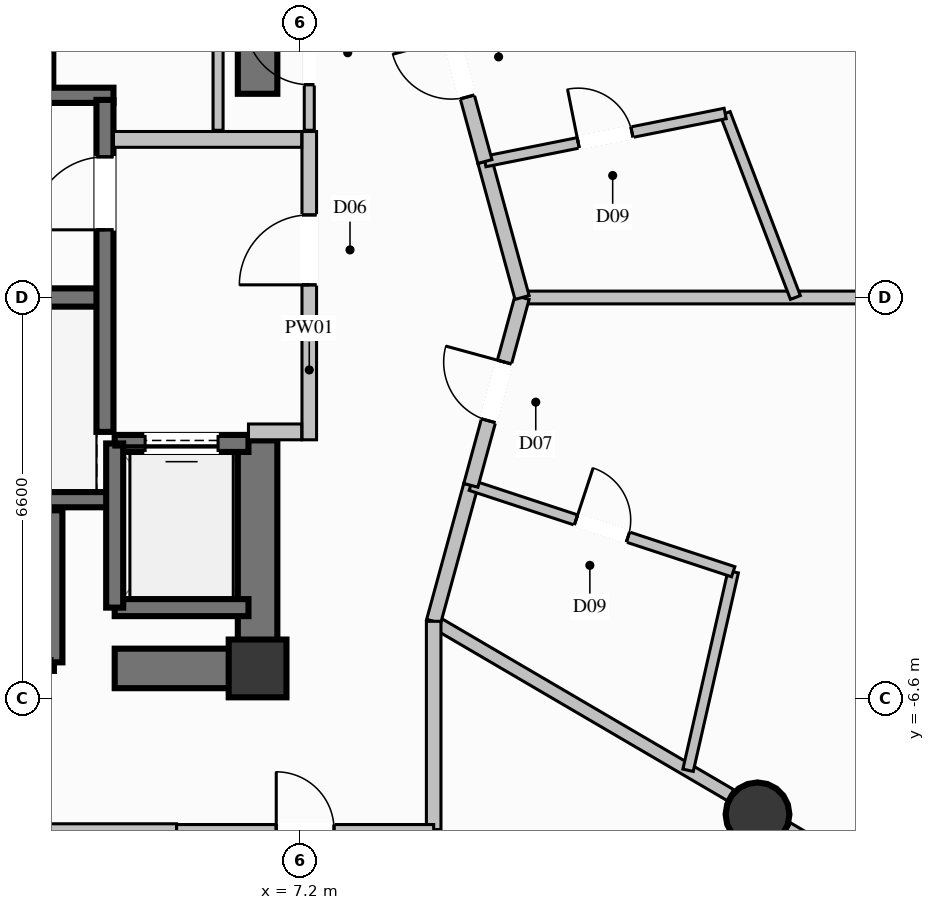
"""IFC4 building model, lengths in metres.
Left out: names, types, materials, properties, quantities, classifications, styles, units other than length and angle.
Written with IfcOpenShell. Run it as: python <this file> out.ifc"""

import sys

from ifc_helpers import new_model, si_unit, direction, frame, frame_2d, origin, origin_2d, place, context, subcontext, project, spatial, rectangle, circle, extrude, element, fill, save


model = new_model("IFC4")
c1 = context("Model", 3, precision=1e-05, world=origin(), true_north=direction((0.0, 1.0)))
c2 = subcontext(c1, "Body", "Model", "MODEL_VIEW")
j1 = project(units=[si_unit("LENGTHUNIT", "METRE"), si_unit("PLANEANGLEUNIT", "RADIAN")], contexts=[c1])
p1 = place(None, origin())
s1 = spatial("IfcSite", under=j1, at=p1, CompositionType="ELEMENT")
p2 = place(p1, origin())
s2 = spatial("IfcBuilding", under=s1, at=p2, CompositionType="ELEMENT")
p3 = place(p2, frame((0.0, 0.0, 109.8)))
s3 = spatial("IfcBuildingStorey", under=s2, at=p3, CompositionType="ELEMENT", Elevation=109.8)
p4 = place(p3, frame((6.5, -6.1, 0.0), z_axis=(0.0, 0.0, 1.0), x_axis=(1.0, 0.0, 0.0)))
e1 = element("IfcColumn", 1, at=p4, inside=s3, PredefinedType="COLUMN", context=c2, shape_type="SweptSolid", body=[
    extrude(rectangle(XDim=0.95, YDim=0.95, at=origin_2d()), origin(), (0.0, 0.0, 1.0), 3.6),
])
p5 = place(p3, frame((-3.99, 0.0, 0.0), z_axis=(0.0, 0.0, 1.0), x_axis=(1.0, 0.0, 0.0)))
e2 = element("IfcWall", 2, at=p5, inside=s3, PredefinedType="SHEAR", context=c2, shape_type="SweptSolid", body=[
    extrude(rectangle(XDim=7.98, YDim=0.3, at=frame_2d((3.99, 0.0))), origin(), (0.0, 0.0, 1.0), 3.6),
])
for number, where, z_axis, x_axis in (
    (3, (-4.13, -3.325, 0.0), (0.0, 0.0, 1.0), (1.0, 0.0, 0.0)),
    (4, (-4.13, 3.325, 0.0), (0.0, 0.0, 1.0), (1.0, 0.0, 0.0)),
):
    element("IfcWall", number, at=place(p3, frame(where, z_axis=z_axis, x_axis=x_axis)), inside=s3, PredefinedType="SOLIDWALL", context=c2, shape_type="SweptSolid", body=[
        extrude(rectangle(XDim=8.26, YDim=0.25, at=frame_2d((4.13, 0.0))), origin(), (0.0, 0.0, 1.0), 3.6),
    ])
p6 = place(p3, frame((4.15, -6.1, 0.0), z_axis=(0.0, 0.0, 1.0), x_axis=(1.0, 0.0, 0.0)))
e5 = element("IfcWall", 5, at=p6, inside=s3, PredefinedType="SHEAR", context=c2, shape_type="SweptSolid", body=[
    extrude(rectangle(XDim=2.025, YDim=0.65, at=frame_2d((1.013, 0.0))), origin(), (0.0, 0.0, 1.0), 3.6),
])
p7 = place(p3, frame((6.5, -6.425, 0.0), z_axis=(0.0, 0.0, 1.0), x_axis=(0.0, 1.0, 0.0)))
e6 = element("IfcWall", 6, at=p7, inside=s3, PredefinedType="SHEAR", context=c2, shape_type="SweptSolid", body=[
    extrude(rectangle(XDim=4.075, YDim=0.65, at=frame_2d((2.038, 0.0))), origin(), (0.0, 0.0, 1.0), 3.6),
])
p8 = place(p3, frame((6.5, 3.35, 0.0), z_axis=(0.0, 0.0, 1.0), x_axis=(0.0, 1.0, 0.0)))
e7 = element("IfcWall", 7, at=p8, inside=s3, PredefinedType="SHEAR", context=c2, shape_type="SweptSolid", body=[
    extrude(rectangle(XDim=3.075, YDim=0.65, at=frame_2d((1.538, 0.0))), origin(), (0.0, 0.0, 1.0), 3.6),
])
p9 = place(p3, frame((14.722, -8.5, 0.0), z_axis=(0.0, 0.0, 1.0), x_axis=(1.0, 0.0, 0.0)))
e8 = element("IfcColumn", 8, at=p9, inside=s3, PredefinedType="COLUMN", context=c2, shape_type="SweptSolid", body=[
    extrude(circle(Radius=0.525, at=origin_2d()), origin(), (0.0, 0.0, 1.0), 3.6),
])
p10 = place(p3, frame((1.05, -6.0, 0.0), z_axis=(0.0, 0.0, 1.0), x_axis=(1.0, 0.0, 0.0)))
e9 = element("IfcWall", 9, at=p10, inside=s3, PredefinedType="SOLIDWALL", context=c2, shape_type="SweptSolid", body=[
    extrude(rectangle(XDim=2.1, YDim=0.28, at=frame_2d((1.05, 0.0))), origin(), (0.0, 0.0, 1.0), 3.35),
])
p11 = place(p10, frame((0.5, 0.0, 0.0)))
e10 = element("IfcOpeningElement", 10, at=p11, cuts=e9, PredefinedType="OPENING", context=c2, shape_type="SweptSolid", body=[
    extrude(rectangle(XDim=1.1, YDim=2.2, at=frame_2d((0.55, 1.1))), frame((0.0, 0.15, 0.0), z_axis=(0.0, -1.0, 0.0), x_axis=(1.0, 0.0, 0.0)), (0.0, 0.0, 1.0), 0.3),
])
for number, where, z_axis, x_axis in (
    (11, (3.15, -6.0, 0.0), (0.0, 0.0, 1.0), (0.0, 1.0, 0.0)),
    (12, (3.0, 3.5, 0.0), (0.0, 0.0, 1.0), (0.0, 1.0, 0.0)),
):
    element("IfcWall", number, at=place(p3, frame(where, z_axis=z_axis, x_axis=x_axis)), inside=s3, PredefinedType="SOLIDWALL", context=c2, shape_type="SweptSolid", body=[
        extrude(rectangle(XDim=2.5, YDim=0.28, at=frame_2d((1.25, 0.0))), origin(), (0.0, 0.0, 1.0), 3.35),
    ])
p12 = place(p3, frame((4.15, -5.1, 0.0), z_axis=(0.0, 0.0, 1.0), x_axis=(1.0, 0.0, 0.0)))
e13 = element("IfcWall", 13, at=p12, inside=s3, PredefinedType="SOLIDWALL", context=c2, shape_type="SweptSolid", body=[
    extrude(rectangle(XDim=2.2, YDim=0.28, at=frame_2d((1.1, 0.0))), origin(), (0.0, 0.0, 1.0), 3.35),
])
p13 = place(p3, frame((6.35, -2.4, 0.0), z_axis=(0.0, 0.0, 1.0), x_axis=(-1.0, 0.0, 0.0)))
e14 = element("IfcWall", 14, at=p13, inside=s3, PredefinedType="SOLIDWALL", context=c2, shape_type="SweptSolid", body=[
    extrude(rectangle(XDim=2.2, YDim=0.28, at=frame_2d((1.1, 0.0))), origin(), (0.0, 0.0, 1.0), 3.35),
])
p14 = place(p13, frame((0.5, 0.0, 0.0)))
e15 = element("IfcOpeningElement", 15, at=p14, cuts=e14, PredefinedType="OPENING", context=c2, shape_type="SweptSolid", body=[
    extrude(rectangle(XDim=1.2, YDim=2.2, at=frame_2d((0.6, 1.1))), frame((0.0, 0.15, 0.0), z_axis=(0.0, -1.0, 0.0), x_axis=(1.0, 0.0, 0.0)), (0.0, 0.0, 1.0), 0.3),
])
p15 = place(p3, frame((4.15, -2.4, 0.0), z_axis=(0.0, 0.0, 1.0), x_axis=(0.0, -1.0, 0.0)))
e16 = element("IfcWall", 16, at=p15, inside=s3, PredefinedType="SOLIDWALL", context=c2, shape_type="SweptSolid", body=[
    extrude(rectangle(XDim=2.7, YDim=0.28, at=frame_2d((1.35, 0.0))), origin(), (0.0, 0.0, 1.0), 3.35),
])
p16 = place(p3, frame((3.99, -2.21, 0.0), z_axis=(0.0, 0.0, 1.0), x_axis=(0.0, 1.0, 0.0)))
e17 = element("IfcWall", 17, at=p16, inside=s3, PredefinedType="SOLIDWALL", context=c2, shape_type="SweptSolid", body=[
    extrude(rectangle(XDim=5.46, YDim=0.28, at=frame_2d((2.73, 0.0))), origin(), (0.0, 0.0, 1.0), 3.35),
])
p17 = place(p16, frame((3.323, 0.0, 0.0)))
e18 = element("IfcOpeningElement", 18, at=p17, cuts=e17, PredefinedType="OPENING", context=c2, shape_type="SweptSolid", body=[
    extrude(rectangle(XDim=1.2, YDim=2.2, at=frame_2d((0.6, 1.1))), frame((0.0, 0.15, 0.0), z_axis=(0.0, -1.0, 0.0), x_axis=(1.0, 0.0, 0.0)), (0.0, 0.0, 1.0), 0.3),
])
p18 = place(p3, frame((7.35, -2.34, 0.0), z_axis=(0.0, 0.0, 1.0), x_axis=(0.0, 1.0, 0.0)))
e19 = element("IfcWall", 19, at=p18, inside=s3, PredefinedType="PARTITIONING", context=c2, shape_type="SweptSolid", body=[
    extrude(rectangle(XDim=5.07, YDim=0.24, at=frame_2d((2.535, 0.0))), origin(), (0.0, 0.0, 1.0), 2.435),
])
p19 = place(p18, frame((2.548, 0.0, 0.0)))
e20 = element("IfcOpeningElement", 20, at=p19, cuts=e19, PredefinedType="OPENING", context=c2, shape_type="SweptSolid", body=[
    extrude(rectangle(XDim=1.15, YDim=2.2, at=frame_2d((0.575, 1.1))), frame((0.0, 0.13, 0.0), z_axis=(0.0, -1.0, 0.0), x_axis=(1.0, 0.0, 0.0)), (0.0, 0.0, 1.0), 0.26),
])
p20 = place(p3, frame((6.35, -2.21, 0.0), z_axis=(0.0, 0.0, 1.0), x_axis=(1.0, 0.0, 0.0)))
e21 = element("IfcWall", 21, at=p20, inside=s3, PredefinedType="PARTITIONING", context=c2, shape_type="SweptSolid", body=[
    extrude(rectangle(XDim=0.875, YDim=0.26, at=frame_2d((0.438, 0.0))), origin(), (0.0, 0.0, 1.0), 3.35),
])
p21 = place(p3, frame((4.13, 2.6, 0.0), z_axis=(0.0, 0.0, 1.0), x_axis=(1.0, 0.0, 0.0)))
e22 = element("IfcWall", 22, at=p21, inside=s3, PredefinedType="PARTITIONING", context=c2, shape_type="SweptSolid", body=[
    extrude(rectangle(XDim=3.095, YDim=0.26, at=frame_2d((1.548, 0.0))), origin(), (0.0, 0.0, 1.0), 3.35),
])
p22 = place(p3, frame((7.35, 2.75, 0.0), z_axis=(0.0, 0.0, 1.0), x_axis=(0.0, 1.0, 0.0)))
e23 = element("IfcWall", 23, at=p22, inside=s3, PredefinedType="PARTITIONING", context=c2, shape_type="SweptSolid", body=[
    extrude(rectangle(XDim=2.55, YDim=0.165, at=frame_2d((1.275, 0.0))), origin(), (0.0, 0.0, 1.0), 3.35),
])
p23 = place(p22, frame((0.75, 0.0, 0.0)))
e24 = element("IfcOpeningElement", 24, at=p23, cuts=e23, PredefinedType="OPENING", context=c2, shape_type="SweptSolid", body=[
    extrude(rectangle(XDim=1.05, YDim=2.15, at=frame_2d((0.525, 1.075))), frame((0.0, 0.093, 0.0), z_axis=(0.0, -1.0, 0.0), x_axis=(1.0, 0.0, 0.0)), (0.0, 0.0, 1.0), 0.185),
])
p24 = place(p3, frame((5.85, 5.3, 0.0), z_axis=(0.0, 0.0, 1.0), x_axis=(0.0, -1.0, 0.0)))
e25 = element("IfcWall", 25, at=p24, inside=s3, PredefinedType="PARTITIONING", context=c2, shape_type="SweptSolid", body=[
    extrude(rectangle(XDim=2.55, YDim=0.165, at=frame_2d((1.275, 0.0))), origin(), (0.0, 0.0, 1.0), 2.435),
])
p25 = place(p3, frame((10.85, 0.0, 0.0), z_axis=(0.0, 0.0, 1.0), x_axis=(1.0, 0.0, 0.0)))
e26 = element("IfcWall", 26, at=p25, inside=s3, PredefinedType="PARTITIONING", context=c2, shape_type="SweptSolid", body=[
    extrude(rectangle(XDim=5.605, YDim=0.21, at=frame_2d((2.802, 0.0))), origin(), (0.0, 0.0, 1.0), 2.421),
])
p26 = place(p3, frame((9.396, -5.325, 0.0), z_axis=(0.0, 0.0, 1.0), x_axis=(0.862912125579, -0.505353998232, 0.0)))
e27 = element("IfcWall", 27, at=p26, inside=s3, PredefinedType="PARTITIONING", context=c2, shape_type="SweptSolid", body=[
    extrude(rectangle(XDim=5.658, YDim=0.21, at=frame_2d((2.829, 0.0))), origin(), (0.0, 0.0, 1.0), 2.791),
])
p27 = place(p3, frame((15.215, -8.732, 0.0), z_axis=(0.0, 0.0, 1.0), x_axis=(0.862960241997, -0.505271828556, 0.0)))
e28 = element("IfcWall", 28, at=p27, inside=s3, PredefinedType="PARTITIONING", context=c2, shape_type="SweptSolid", body=[
    extrude(rectangle(XDim=7.517, YDim=0.21, at=frame_2d((3.758, 0.0))), origin(), (0.0, 0.0, 1.0), 3.35),
])
p28 = place(p3, frame((9.396, -5.325, 0.0), z_axis=(0.0, 0.0, 1.0), x_axis=(0.263643210908, 0.964620265878, 0.0)))
e29 = element("IfcWall", 29, at=p28, inside=s3, PredefinedType="PARTITIONING", context=c2, shape_type="SweptSolid", body=[
    extrude(rectangle(XDim=2.318, YDim=0.24, at=frame_2d((1.159, 0.0))), origin(), (0.0, 0.0, 1.0), 3.35),
])
p29 = place(p3, frame((13.58, -7.775, 0.0), z_axis=(0.0, 0.0, 1.0), x_axis=(0.221599041774, 0.975137869578, 0.0)))
e30 = element("IfcWall", 30, at=p29, inside=s3, PredefinedType="PLUMBINGWALL", context=c2, shape_type="SweptSolid", body=[
    extrude(rectangle(XDim=3.348, YDim=0.175, at=frame_2d((1.674, 0.0))), origin(), (0.0, 0.0, 1.0), 3.35),
])
p30 = place(p3, frame((10.007, -3.089, 0.0), z_axis=(0.0, 0.0, 1.0), x_axis=(0.949827092004, -0.312775471057, 0.0)))
e31 = element("IfcWall", 31, at=p30, inside=s3, PredefinedType="PLUMBINGWALL", context=c2, shape_type="SweptSolid", body=[
    extrude(rectangle(XDim=4.543, YDim=0.175, at=frame_2d((2.271, 0.0))), origin(), (0.0, 0.0, 1.0), 3.35),
])
p31 = place(p30, frame((1.821, 0.0, 0.0)))
e32 = element("IfcOpeningElement", 32, at=p31, cuts=e31, PredefinedType="OPENING", context=c2, shape_type="SweptSolid", body=[
    extrude(rectangle(XDim=0.9, YDim=2.1, at=frame_2d((0.45, 1.05))), frame((0.0, 0.098, 0.0), z_axis=(0.0, -1.0, 0.0), x_axis=(1.0, 0.0, 0.0)), (0.0, 0.0, 1.0), 0.195),
])
p32 = place(p3, frame((10.007, -3.089, 0.0), z_axis=(0.0, 0.0, 1.0), x_axis=(0.263272237376, 0.964721581093, 0.0)))
e33 = element("IfcWall", 33, at=p32, inside=s3, PredefinedType="PARTITIONING", context=c2, shape_type="SweptSolid", body=[
    extrude(rectangle(XDim=3.202, YDim=0.24, at=frame_2d((1.601, 0.0))), origin(), (0.0, 0.0, 1.0), 2.985),
])
p33 = place(p32, frame((1.101, 0.0, 0.0)))
e34 = element("IfcOpeningElement", 34, at=p33, cuts=e33, PredefinedType="OPENING", context=c2, shape_type="SweptSolid", body=[
    extrude(rectangle(XDim=1.0, YDim=2.2, at=frame_2d((0.5, 1.1))), frame((0.0, 0.13, 0.0), z_axis=(0.0, -1.0, 0.0), x_axis=(1.0, 0.0, 0.0)), (0.0, 0.0, 1.0), 0.26),
])
p34 = place(p3, frame((10.85, 0.0, 0.0), z_axis=(0.0, 0.0, 1.0), x_axis=(-0.263616426241, 0.964627586074, 0.0)))
e35 = element("IfcWall", 35, at=p34, inside=s3, PredefinedType="PARTITIONING", context=c2, shape_type="SweptSolid", body=[
    extrude(rectangle(XDim=2.318, YDim=0.24, at=frame_2d((1.159, 0.0))), origin(), (0.0, 0.0, 1.0), 2.985),
])
p35 = place(p3, frame((15.345, 0.0, 0.0), z_axis=(0.0, 0.0, 1.0), x_axis=(-0.35661902988, 0.934249895653, 0.0)))
e36 = element("IfcWall", 36, at=p35, inside=s3, PredefinedType="PLUMBINGWALL", context=c2, shape_type="SweptSolid", body=[
    extrude(rectangle(XDim=3.239, YDim=0.175, at=frame_2d((1.619, 0.0))), origin(), (0.0, 0.0, 1.0), 3.35),
])
p36 = place(p3, frame((10.239, 2.236, 0.0), z_axis=(0.0, 0.0, 1.0), x_axis=(0.980599315693, 0.196022912085, 0.0)))
e37 = element("IfcWall", 37, at=p36, inside=s3, PredefinedType="PLUMBINGWALL", context=c2, shape_type="SweptSolid", body=[
    extrude(rectangle(XDim=4.029, YDim=0.175, at=frame_2d((2.015, 0.0))), origin(), (0.0, 0.0, 1.0), 3.35),
])
p37 = place(p36, frame((1.565, 0.0, 0.0)))
e38 = element("IfcOpeningElement", 38, at=p37, cuts=e37, PredefinedType="OPENING", context=c2, shape_type="SweptSolid", body=[
    extrude(rectangle(XDim=0.9, YDim=2.1, at=frame_2d((0.45, 1.05))), frame((0.0, 0.098, 0.0), z_axis=(0.0, -1.0, 0.0), x_axis=(1.0, 0.0, 0.0)), (0.0, 0.0, 1.0), 0.195),
])
p38 = place(p3, frame((10.239, 2.236, 0.0), z_axis=(0.0, 0.0, 1.0), x_axis=(-0.26329160366, 0.964716295831, 0.0)))
e39 = element("IfcWall", 39, at=p38, inside=s3, PredefinedType="PARTITIONING", context=c2, shape_type="SweptSolid", body=[
    extrude(rectangle(XDim=3.202, YDim=0.24, at=frame_2d((1.601, 0.0))), origin(), (0.0, 0.0, 1.0), 3.35),
])
p39 = place(p38, frame((1.101, 0.0, 0.0)))
e40 = element("IfcOpeningElement", 40, at=p39, cuts=e39, PredefinedType="OPENING", context=c2, shape_type="SweptSolid", body=[
    extrude(rectangle(XDim=1.0, YDim=2.2, at=frame_2d((0.5, 1.1))), frame((0.0, 0.13, 0.0), z_axis=(0.0, -1.0, 0.0), x_axis=(1.0, 0.0, 0.0)), (0.0, 0.0, 1.0), 0.26),
])
p40 = place(p3, frame((5.168, -8.75, 0.0), z_axis=(0.0, 0.0, 1.0), x_axis=(0.319791389232, -0.947487977429, 0.0)))
e41 = element("IfcWall", 41, at=p40, inside=s3, PredefinedType="PARTITIONING", context=c2, shape_type="SweptSolid", body=[
    extrude(rectangle(XDim=12.468, YDim=0.21, at=frame_2d((6.234, 0.0))), origin(), (0.0, 0.0, 1.0), 3.35),
])
p41 = place(p3, frame((0.0, -8.75, 0.0), z_axis=(0.0, 0.0, 1.0), x_axis=(1.0, 0.0, 0.0)))
e42 = element("IfcWall", 42, at=p41, inside=s3, PredefinedType="PARTITIONING", context=c2, shape_type="SweptSolid", body=[
    extrude(rectangle(XDim=5.168, YDim=0.19, at=frame_2d((2.584, 0.0))), origin(), (0.0, 0.0, 1.0), 3.35),
])
p42 = place(p41, frame((2.109, 0.0, 0.0)))
e43 = element("IfcOpeningElement", 43, at=p42, cuts=e42, PredefinedType="OPENING", context=c2, shape_type="SweptSolid", body=[
    extrude(rectangle(XDim=0.95, YDim=2.1, at=frame_2d((0.475, 1.05))), frame((0.0, 0.105, 0.0), z_axis=(0.0, -1.0, 0.0), x_axis=(1.0, 0.0, 0.0)), (0.0, 0.0, 1.0), 0.21),
])
p43 = place(p3, frame((9.396, -8.75, 0.0), z_axis=(0.0, 0.0, 1.0), x_axis=(0.0, 1.0, 0.0)))
e44 = element("IfcWall", 44, at=p43, inside=s3, PredefinedType="PARTITIONING", context=c2, shape_type="SweptSolid", body=[
    extrude(rectangle(XDim=3.425, YDim=0.24, at=frame_2d((1.712, 0.0))), origin(), (0.0, 0.0, 1.0), 3.35),
])
p44 = place(p3, frame((5.168, -8.75, 0.0), z_axis=(0.0, 0.0, 1.0), x_axis=(1.0, 0.0, 0.0)))
e45 = element("IfcWall", 45, at=p44, inside=s3, PredefinedType="PARTITIONING", context=c2, shape_type="SweptSolid", body=[
    extrude(rectangle(XDim=4.228, YDim=0.165, at=frame_2d((2.114, 0.0))), origin(), (0.0, 0.0, 1.0), 3.35),
])
p45 = place(p44, frame((1.639, 0.0, 0.0)))
e46 = element("IfcOpeningElement", 46, at=p45, cuts=e45, PredefinedType="OPENING", context=c2, shape_type="SweptSolid", body=[
    extrude(rectangle(XDim=0.95, YDim=2.1, at=frame_2d((0.475, 1.05))), frame((0.0, 0.093, 0.0), z_axis=(0.0, -1.0, 0.0), x_axis=(1.0, 0.0, 0.0)), (0.0, 0.0, 1.0), 0.185),
])
p46 = place(p14, origin())
e47 = element("IfcDoor", 47, at=p46, inside=s3, OperationType="SLIDING_TO_LEFT", PredefinedType="DOOR", context=c2, shape_type="SweptSolid", body=[
    extrude(rectangle(XDim=1.2, YDim=2.2, at=frame_2d((0.6, 1.1))), frame((0.0, 0.025, 0.0), z_axis=(0.0, -1.0, 0.0), x_axis=(1.0, 0.0, 0.0)), (0.0, 0.0, 1.0), 0.05),
])
fill(e15, e47)
p47 = place(p17, origin())
e48 = element("IfcDoor", 48, at=p47, inside=s3, OperationType="SINGLE_SWING_LEFT", PredefinedType="DOOR", context=c2, shape_type="SweptSolid", body=[
    extrude(rectangle(XDim=1.2, YDim=2.2, at=frame_2d((0.6, 1.1))), frame((0.0, 0.025, 0.0), z_axis=(0.0, -1.0, 0.0), x_axis=(1.0, 0.0, 0.0)), (0.0, 0.0, 1.0), 0.05),
])
fill(e18, e48)
p48 = place(p19, origin())
e49 = element("IfcDoor", 49, at=p48, inside=s3, OperationType="SINGLE_SWING_LEFT", PredefinedType="DOOR", context=c2, shape_type="SweptSolid", body=[
    extrude(rectangle(XDim=1.15, YDim=2.2, at=frame_2d((0.575, 1.1))), frame((0.0, 0.025, 0.0), z_axis=(0.0, -1.0, 0.0), x_axis=(1.0, 0.0, 0.0)), (0.0, 0.0, 1.0), 0.05),
])
fill(e20, e49)
p49 = place(p23, origin())
e50 = element("IfcDoor", 50, at=p49, inside=s3, OperationType="SINGLE_SWING_RIGHT", PredefinedType="DOOR", context=c2, shape_type="SweptSolid", body=[
    extrude(rectangle(XDim=1.05, YDim=2.15, at=frame_2d((0.525, 1.075))), frame((0.0, 0.025, 0.0), z_axis=(0.0, -1.0, 0.0), x_axis=(1.0, 0.0, 0.0)), (0.0, 0.0, 1.0), 0.05),
])
fill(e24, e50)
p50 = place(p31, origin())
e51 = element("IfcDoor", 51, at=p50, inside=s3, OperationType="SINGLE_SWING_LEFT", PredefinedType="DOOR", context=c2, shape_type="SweptSolid", body=[
    extrude(rectangle(XDim=0.9, YDim=2.1, at=frame_2d((0.45, 1.05))), frame((0.0, 0.025, 0.0), z_axis=(0.0, -1.0, 0.0), x_axis=(1.0, 0.0, 0.0)), (0.0, 0.0, 1.0), 0.05),
])
fill(e32, e51)
p51 = place(p33, origin())
e52 = element("IfcDoor", 52, at=p51, inside=s3, OperationType="SINGLE_SWING_RIGHT", PredefinedType="DOOR", context=c2, shape_type="SweptSolid", body=[
    extrude(rectangle(XDim=1.0, YDim=2.2, at=frame_2d((0.5, 1.1))), frame((0.0, 0.025, 0.0), z_axis=(0.0, -1.0, 0.0), x_axis=(1.0, 0.0, 0.0)), (0.0, 0.0, 1.0), 0.05),
])
fill(e34, e52)
p52 = place(p37, origin())
e53 = element("IfcDoor", 53, at=p52, inside=s3, OperationType="SINGLE_SWING_LEFT", PredefinedType="DOOR", context=c2, shape_type="SweptSolid", body=[
    extrude(rectangle(XDim=0.9, YDim=2.1, at=frame_2d((0.45, 1.05))), frame((0.0, 0.025, 0.0), z_axis=(0.0, -1.0, 0.0), x_axis=(1.0, 0.0, 0.0)), (0.0, 0.0, 1.0), 0.05),
])
fill(e38, e53)
p53 = place(p39, origin())
e54 = element("IfcDoor", 54, at=p53, inside=s3, OperationType="SINGLE_SWING_RIGHT", PredefinedType="DOOR", context=c2, shape_type="SweptSolid", body=[
    extrude(rectangle(XDim=1.0, YDim=2.2, at=frame_2d((0.5, 1.1))), frame((0.0, 0.025, 0.0), z_axis=(0.0, -1.0, 0.0), x_axis=(1.0, 0.0, 0.0)), (0.0, 0.0, 1.0), 0.05),
])
fill(e40, e54)
p54 = place(p45, origin())
e55 = element("IfcDoor", 55, at=p54, inside=s3, OperationType="SINGLE_SWING_LEFT", PredefinedType="DOOR", context=c2, shape_type="SweptSolid", body=[
    extrude(rectangle(XDim=0.95, YDim=2.1, at=frame_2d((0.475, 1.05))), frame((0.0, 0.025, 0.0), z_axis=(0.0, -1.0, 0.0), x_axis=(1.0, 0.0, 0.0)), (0.0, 0.0, 1.0), 0.05),
])
fill(e46, e55)
save(model, sys.argv[1])
